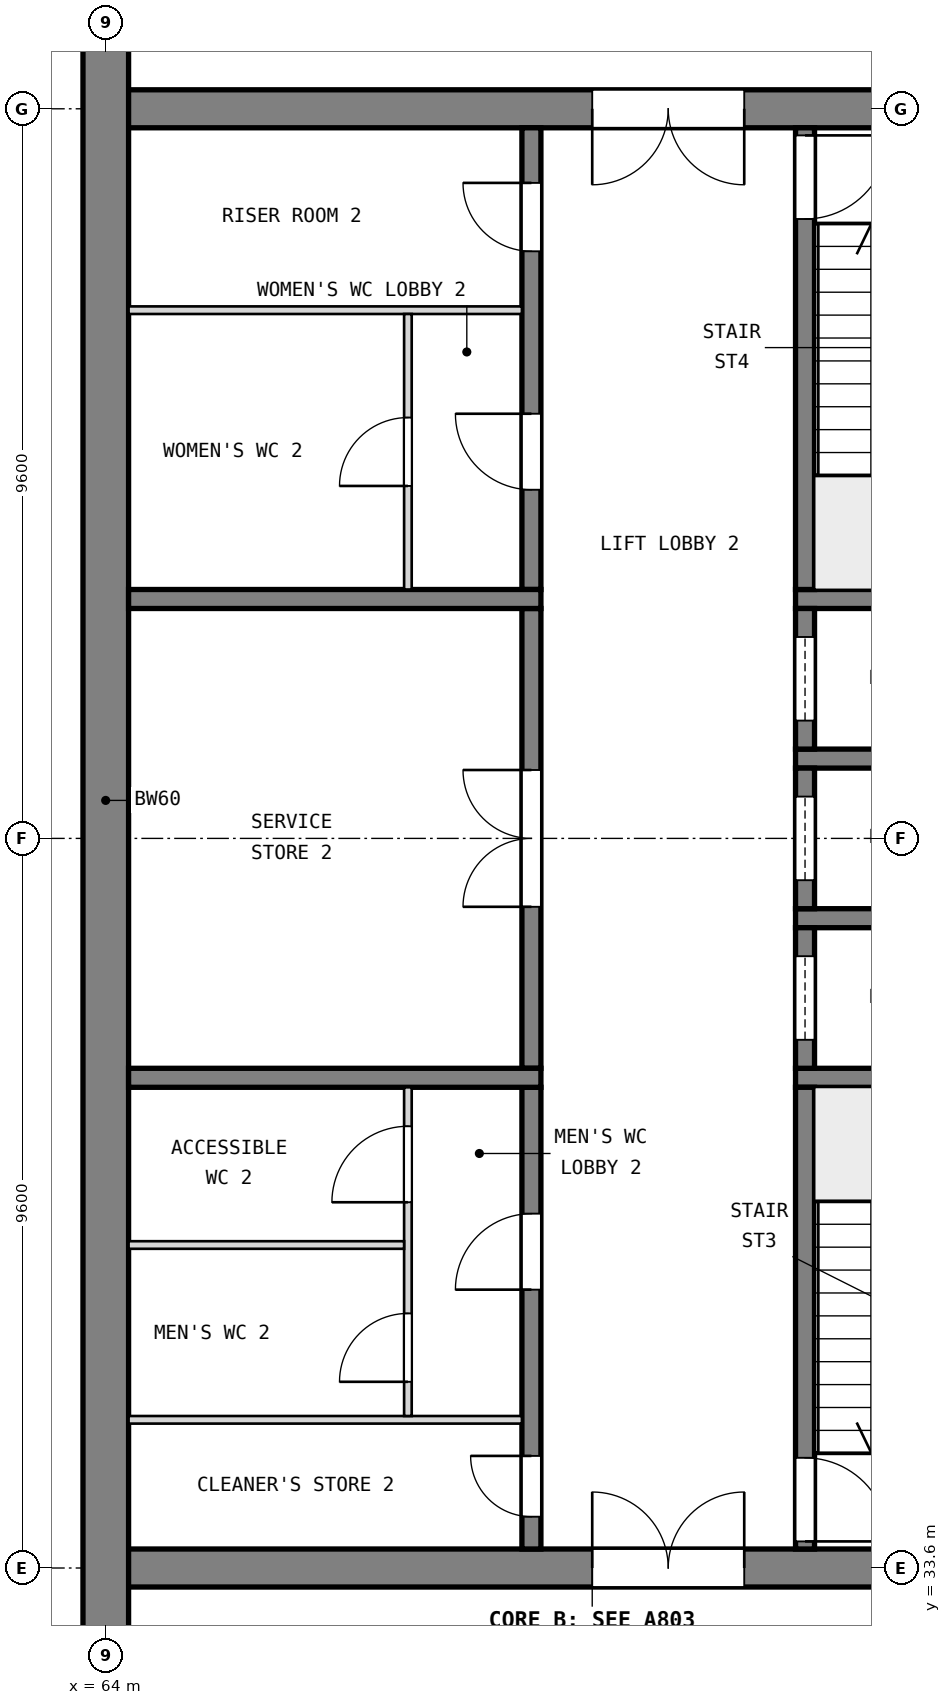
"""IFC4 building model, lengths in metres.
Left out: names, types, materials, properties, quantities, classifications, styles, units other than length and angle.
Written with IfcOpenShell. Run it as: python <this file> out.ifc"""

import sys

from ifc_helpers import new_model, si_unit, direction, frame, frame_2d, origin, place, context, subcontext, project, spatial, rectangle, extrude, element, fill, save


model = new_model("IFC4")
c1 = context("Model", 3, precision=1e-05, world=origin(), true_north=direction((0.0, 1.0)))
c2 = subcontext(c1, "Body", "Model", "MODEL_VIEW")
j1 = project(units=[si_unit("LENGTHUNIT", "METRE"), si_unit("PLANEANGLEUNIT", "RADIAN")], contexts=[c1])
p1 = place(None, origin())
s1 = spatial("IfcSite", under=j1, at=p1, CompositionType="ELEMENT")
p2 = place(p1, origin())
s2 = spatial("IfcBuilding", under=s1, at=p2, CompositionType="ELEMENT")
p3 = place(p2, frame((0.0, 0.0, 4.2)))
s3 = spatial("IfcBuildingStorey", under=s2, at=p3, CompositionType="ELEMENT", Elevation=4.2)
p4 = place(p3, frame((63.75, 52.8, 0.0), z_axis=(0.0, 0.0, 1.0), x_axis=(1.0, 0.0, 0.0)))
e1 = element("IfcWall", 1, at=p4, inside=s3, PredefinedType="SHEAR", context=c2, shape_type="SweptSolid", body=[
    extrude(rectangle(XDim=13.3, YDim=0.5, at=frame_2d((6.65, 0.0))), origin(), (0.0, 0.0, 1.0), 4.2),
])
p5 = place(p4, frame((6.65, 0.0, 0.0)))
e2 = element("IfcOpeningElement", 2, at=p5, cuts=e1, PredefinedType="OPENING", context=c2, shape_type="SweptSolid", body=[
    extrude(rectangle(XDim=2.0, YDim=2.1, at=frame_2d((1.0, 1.05))), frame((0.0, 0.26, 0.0), z_axis=(0.0, -1.0, 0.0), x_axis=(1.0, 0.0, 0.0)), (0.0, 0.0, 1.0), 0.52),
])
p6 = place(p3, frame((63.75, 33.6, 0.0), z_axis=(0.0, 0.0, 1.0), x_axis=(1.0, 0.0, 0.0)))
e3 = element("IfcWall", 3, at=p6, inside=s3, PredefinedType="SHEAR", context=c2, shape_type="SweptSolid", body=[
    extrude(rectangle(XDim=13.3, YDim=0.5, at=frame_2d((6.65, 0.0))), origin(), (0.0, 0.0, 1.0), 4.2),
])
p7 = place(p6, frame((6.65, 0.0, 0.0)))
e4 = element("IfcOpeningElement", 4, at=p7, cuts=e3, PredefinedType="OPENING", context=c2, shape_type="SweptSolid", body=[
    extrude(rectangle(XDim=2.0, YDim=2.1, at=frame_2d((1.0, 1.05))), frame((0.0, 0.26, 0.0), z_axis=(0.0, -1.0, 0.0), x_axis=(1.0, 0.0, 0.0)), (0.0, 0.0, 1.0), 0.52),
])
p8 = place(p3, frame((64.0, 28.8, 0.0), z_axis=(0.0, 0.0, 1.0), x_axis=(0.0, 1.0, 0.0)))
e5 = element("IfcWall", 5, at=p8, inside=s3, PredefinedType="SHEAR", context=c2, shape_type="SweptSolid", body=[
    extrude(rectangle(XDim=28.8, YDim=0.6, at=frame_2d((14.4, 0.0))), origin(), (0.0, 0.0, 1.0), 4.2),
])
for number, where, z_axis, x_axis in (
    (6, (76.55, 40.05, 0.0), (0.0, 0.0, 1.0), (-1.0, 0.0, 0.0)),
    (7, (76.55, 42.15, 0.0), (0.0, 0.0, 1.0), (-1.0, 0.0, 0.0)),
    (8, (76.55, 44.25, 0.0), (0.0, 0.0, 1.0), (-1.0, 0.0, 0.0)),
    (9, (76.55, 46.35, 0.0), (0.0, 0.0, 1.0), (-1.0, 0.0, 0.0)),
):
    element("IfcWall", number, at=place(p3, frame(where, z_axis=z_axis, x_axis=x_axis)), inside=s3, PredefinedType="SOLIDWALL", context=c2, shape_type="SweptSolid", body=[
        extrude(rectangle(XDim=3.475, YDim=0.25, at=frame_2d((1.738, 0.0))), origin(), (0.0, 0.0, 1.0), 3.9),
    ])
p9 = place(p3, frame((73.2, 33.85, 0.0), z_axis=(0.0, 0.0, 1.0), x_axis=(0.0, 1.0, 0.0)))
e10 = element("IfcWall", 10, at=p9, inside=s3, PredefinedType="SOLIDWALL", context=c2, shape_type="SweptSolid", body=[
    extrude(rectangle(XDim=6.075, YDim=0.25, at=frame_2d((3.038, 0.0))), origin(), (0.0, 0.0, 1.0), 3.9),
])
p10 = place(p9, frame((0.1, 0.0, 0.0)))
e11 = element("IfcOpeningElement", 11, at=p10, cuts=e10, PredefinedType="OPENING", context=c2, shape_type="SweptSolid", body=[
    extrude(rectangle(XDim=1.1, YDim=2.1, at=frame_2d((0.55, 1.05))), frame((0.0, 0.135, 0.0), z_axis=(0.0, -1.0, 0.0), x_axis=(1.0, 0.0, 0.0)), (0.0, 0.0, 1.0), 0.27),
])
p11 = place(p3, frame((73.2, 40.175, 0.0), z_axis=(0.0, 0.0, 1.0), x_axis=(0.0, 1.0, 0.0)))
e12 = element("IfcWall", 12, at=p11, inside=s3, PredefinedType="SOLIDWALL", context=c2, shape_type="SweptSolid", body=[
    extrude(rectangle(XDim=1.85, YDim=0.25, at=frame_2d((0.925, 0.0))), origin(), (0.0, 0.0, 1.0), 3.9),
])
p12 = place(p11, frame((0.375, 0.0, 0.0)))
e13 = element("IfcOpeningElement", 13, at=p12, cuts=e12, PredefinedType="OPENING", context=c2, shape_type="SweptSolid", body=[
    extrude(rectangle(XDim=1.1, YDim=2.1, at=frame_2d((0.55, 1.05))), frame((0.0, 0.135, 0.0), z_axis=(0.0, -1.0, 0.0), x_axis=(1.0, 0.0, 0.0)), (0.0, 0.0, 1.0), 0.27),
])
p13 = place(p3, frame((73.2, 42.275, 0.0), z_axis=(0.0, 0.0, 1.0), x_axis=(0.0, 1.0, 0.0)))
e14 = element("IfcWall", 14, at=p13, inside=s3, PredefinedType="SOLIDWALL", context=c2, shape_type="SweptSolid", body=[
    extrude(rectangle(XDim=1.85, YDim=0.25, at=frame_2d((0.925, 0.0))), origin(), (0.0, 0.0, 1.0), 3.9),
])
p14 = place(p13, frame((0.375, 0.0, 0.0)))
e15 = element("IfcOpeningElement", 15, at=p14, cuts=e14, PredefinedType="OPENING", context=c2, shape_type="SweptSolid", body=[
    extrude(rectangle(XDim=1.1, YDim=2.1, at=frame_2d((0.55, 1.05))), frame((0.0, 0.135, 0.0), z_axis=(0.0, -1.0, 0.0), x_axis=(1.0, 0.0, 0.0)), (0.0, 0.0, 1.0), 0.27),
])
p15 = place(p3, frame((73.2, 44.375, 0.0), z_axis=(0.0, 0.0, 1.0), x_axis=(0.0, 1.0, 0.0)))
e16 = element("IfcWall", 16, at=p15, inside=s3, PredefinedType="SOLIDWALL", context=c2, shape_type="SweptSolid", body=[
    extrude(rectangle(XDim=1.85, YDim=0.25, at=frame_2d((0.925, 0.0))), origin(), (0.0, 0.0, 1.0), 3.9),
])
p16 = place(p15, frame((0.375, 0.0, 0.0)))
e17 = element("IfcOpeningElement", 17, at=p16, cuts=e16, PredefinedType="OPENING", context=c2, shape_type="SweptSolid", body=[
    extrude(rectangle(XDim=1.1, YDim=2.1, at=frame_2d((0.55, 1.05))), frame((0.0, 0.135, 0.0), z_axis=(0.0, -1.0, 0.0), x_axis=(1.0, 0.0, 0.0)), (0.0, 0.0, 1.0), 0.27),
])
p17 = place(p3, frame((73.2, 46.475, 0.0), z_axis=(0.0, 0.0, 1.0), x_axis=(0.0, 1.0, 0.0)))
e18 = element("IfcWall", 18, at=p17, inside=s3, PredefinedType="SOLIDWALL", context=c2, shape_type="SweptSolid", body=[
    extrude(rectangle(XDim=6.075, YDim=0.25, at=frame_2d((3.038, 0.0))), origin(), (0.0, 0.0, 1.0), 3.9),
])
p18 = place(p17, frame((4.875, 0.0, 0.0)))
e19 = element("IfcOpeningElement", 19, at=p18, cuts=e18, PredefinedType="OPENING", context=c2, shape_type="SweptSolid", body=[
    extrude(rectangle(XDim=1.1, YDim=2.1, at=frame_2d((0.55, 1.05))), frame((0.0, 0.135, 0.0), z_axis=(0.0, -1.0, 0.0), x_axis=(1.0, 0.0, 0.0)), (0.0, 0.0, 1.0), 0.27),
])
p19 = place(p3, frame((69.6, 33.85, 0.0), z_axis=(0.0, 0.0, 1.0), x_axis=(0.0, 1.0, 0.0)))
e20 = element("IfcWall", 20, at=p19, inside=s3, PredefinedType="SOLIDWALL", context=c2, shape_type="SweptSolid", body=[
    extrude(rectangle(XDim=6.075, YDim=0.25, at=frame_2d((3.038, 0.0))), origin(), (0.0, 0.0, 1.0), 3.9),
])
p20 = place(p19, frame((0.425, 0.0, 0.0)))
e21 = element("IfcOpeningElement", 21, at=p20, cuts=e20, PredefinedType="OPENING", context=c2, shape_type="SweptSolid", body=[
    extrude(rectangle(XDim=0.8, YDim=2.1, at=frame_2d((0.4, 1.05))), frame((0.0, 0.135, 0.0), z_axis=(0.0, -1.0, 0.0), x_axis=(1.0, 0.0, 0.0)), (0.0, 0.0, 1.0), 0.27),
])
p21 = place(p19, frame((3.413, 0.0, 0.0)))
e22 = element("IfcOpeningElement", 22, at=p21, cuts=e20, PredefinedType="OPENING", context=c2, shape_type="SweptSolid", body=[
    extrude(rectangle(XDim=1.0, YDim=2.1, at=frame_2d((0.5, 1.05))), frame((0.0, 0.135, 0.0), z_axis=(0.0, -1.0, 0.0), x_axis=(1.0, 0.0, 0.0)), (0.0, 0.0, 1.0), 0.27),
])
p22 = place(p3, frame((69.6, 40.175, 0.0), z_axis=(0.0, 0.0, 1.0), x_axis=(0.0, 1.0, 0.0)))
e23 = element("IfcWall", 23, at=p22, inside=s3, PredefinedType="SOLIDWALL", context=c2, shape_type="SweptSolid", body=[
    extrude(rectangle(XDim=6.05, YDim=0.25, at=frame_2d((3.025, 0.0))), origin(), (0.0, 0.0, 1.0), 3.9),
])
p23 = place(p22, frame((2.125, 0.0, 0.0)))
e24 = element("IfcOpeningElement", 24, at=p23, cuts=e23, PredefinedType="OPENING", context=c2, shape_type="SweptSolid", body=[
    extrude(rectangle(XDim=1.8, YDim=2.1, at=frame_2d((0.9, 1.05))), frame((0.0, 0.135, 0.0), z_axis=(0.0, -1.0, 0.0), x_axis=(1.0, 0.0, 0.0)), (0.0, 0.0, 1.0), 0.27),
])
p24 = place(p3, frame((69.6, 46.475, 0.0), z_axis=(0.0, 0.0, 1.0), x_axis=(0.0, 1.0, 0.0)))
e25 = element("IfcWall", 25, at=p24, inside=s3, PredefinedType="SOLIDWALL", context=c2, shape_type="SweptSolid", body=[
    extrude(rectangle(XDim=6.075, YDim=0.25, at=frame_2d((3.038, 0.0))), origin(), (0.0, 0.0, 1.0), 3.9),
])
p25 = place(p24, frame((1.312, 0.0, 0.0)))
e26 = element("IfcOpeningElement", 26, at=p25, cuts=e25, PredefinedType="OPENING", context=c2, shape_type="SweptSolid", body=[
    extrude(rectangle(XDim=1.0, YDim=2.1, at=frame_2d((0.5, 1.05))), frame((0.0, 0.135, 0.0), z_axis=(0.0, -1.0, 0.0), x_axis=(1.0, 0.0, 0.0)), (0.0, 0.0, 1.0), 0.27),
])
p26 = place(p24, frame((4.45, 0.0, 0.0)))
e27 = element("IfcOpeningElement", 27, at=p26, cuts=e25, PredefinedType="OPENING", context=c2, shape_type="SweptSolid", body=[
    extrude(rectangle(XDim=0.9, YDim=2.1, at=frame_2d((0.45, 1.05))), frame((0.0, 0.135, 0.0), z_axis=(0.0, -1.0, 0.0), x_axis=(1.0, 0.0, 0.0)), (0.0, 0.0, 1.0), 0.27),
])
for number, where, z_axis, x_axis in (
    (28, (69.725, 40.05, 0.0), (0.0, 0.0, 1.0), (-1.0, 0.0, 0.0)),
    (29, (69.725, 46.35, 0.0), (0.0, 0.0, 1.0), (-1.0, 0.0, 0.0)),
):
    element("IfcWall", number, at=place(p3, frame(where, z_axis=z_axis, x_axis=x_axis)), inside=s3, PredefinedType="SOLIDWALL", context=c2, shape_type="SweptSolid", body=[
        extrude(rectangle(XDim=5.425, YDim=0.25, at=frame_2d((2.712, 0.0))), origin(), (0.0, 0.0, 1.0), 3.9),
    ])
p27 = place(p3, frame((69.475, 35.55, 0.0), z_axis=(0.0, 0.0, 1.0), x_axis=(-1.0, 0.0, 0.0)))
e30 = element("IfcWall", 30, at=p27, inside=s3, PredefinedType="PARTITIONING", context=c2, shape_type="SweptSolid", body=[
    extrude(rectangle(XDim=5.175, YDim=0.1, at=frame_2d((2.587, 0.0))), origin(), (0.0, 0.0, 1.0), 3.9),
])
p28 = place(p3, frame((67.975, 35.6, 0.0), z_axis=(0.0, 0.0, 1.0), x_axis=(0.0, 1.0, 0.0)))
e31 = element("IfcWall", 31, at=p28, inside=s3, PredefinedType="PARTITIONING", context=c2, shape_type="SweptSolid", body=[
    extrude(rectangle(XDim=4.325, YDim=0.1, at=frame_2d((2.163, 0.0))), origin(), (0.0, 0.0, 1.0), 3.9),
])
p29 = place(p28, frame((0.45, 0.0, 0.0)))
e32 = element("IfcOpeningElement", 32, at=p29, cuts=e31, PredefinedType="OPENING", context=c2, shape_type="SweptSolid", body=[
    extrude(rectangle(XDim=0.9, YDim=2.1, at=frame_2d((0.45, 1.05))), frame((0.0, 0.06, 0.0), z_axis=(0.0, -1.0, 0.0), x_axis=(1.0, 0.0, 0.0)), (0.0, 0.0, 1.0), 0.12),
])
p30 = place(p28, frame((2.812, 0.0, 0.0)))
e33 = element("IfcOpeningElement", 33, at=p30, cuts=e31, PredefinedType="OPENING", context=c2, shape_type="SweptSolid", body=[
    extrude(rectangle(XDim=1.0, YDim=2.1, at=frame_2d((0.5, 1.05))), frame((0.0, 0.06, 0.0), z_axis=(0.0, -1.0, 0.0), x_axis=(1.0, 0.0, 0.0)), (0.0, 0.0, 1.0), 0.12),
])
p31 = place(p3, frame((67.925, 37.85, 0.0), z_axis=(0.0, 0.0, 1.0), x_axis=(-1.0, 0.0, 0.0)))
e34 = element("IfcWall", 34, at=p31, inside=s3, PredefinedType="PARTITIONING", context=c2, shape_type="SweptSolid", body=[
    extrude(rectangle(XDim=3.625, YDim=0.1, at=frame_2d((1.812, 0.0))), origin(), (0.0, 0.0, 1.0), 3.9),
])
p32 = place(p3, frame((69.475, 50.15, 0.0), z_axis=(0.0, 0.0, 1.0), x_axis=(-1.0, 0.0, 0.0)))
e35 = element("IfcWall", 35, at=p32, inside=s3, PredefinedType="PARTITIONING", context=c2, shape_type="SweptSolid", body=[
    extrude(rectangle(XDim=5.175, YDim=0.1, at=frame_2d((2.587, 0.0))), origin(), (0.0, 0.0, 1.0), 3.9),
])
p33 = place(p3, frame((67.975, 46.475, 0.0), z_axis=(0.0, 0.0, 1.0), x_axis=(0.0, 1.0, 0.0)))
e36 = element("IfcWall", 36, at=p33, inside=s3, PredefinedType="PARTITIONING", context=c2, shape_type="SweptSolid", body=[
    extrude(rectangle(XDim=3.625, YDim=0.1, at=frame_2d((1.812, 0.0))), origin(), (0.0, 0.0, 1.0), 3.9),
])
p34 = place(p33, frame((1.363, 0.0, 0.0)))
e37 = element("IfcOpeningElement", 37, at=p34, cuts=e36, PredefinedType="OPENING", context=c2, shape_type="SweptSolid", body=[
    extrude(rectangle(XDim=0.9, YDim=2.1, at=frame_2d((0.45, 1.05))), frame((0.0, 0.06, 0.0), z_axis=(0.0, -1.0, 0.0), x_axis=(1.0, 0.0, 0.0)), (0.0, 0.0, 1.0), 0.12),
])
p35 = place(p10, frame((1.1, 0.0, 0.0), z_axis=(0.0, 0.0, 1.0), x_axis=(-1.0, 0.0, 0.0)))
e38 = element("IfcDoor", 38, at=p35, inside=s3, OperationType="SINGLE_SWING_RIGHT", PredefinedType="DOOR", context=c2, shape_type="SweptSolid", body=[
    extrude(rectangle(XDim=1.1, YDim=2.1, at=frame_2d((0.55, 1.05))), frame((0.0, 0.025, 0.0), z_axis=(0.0, -1.0, 0.0), x_axis=(1.0, 0.0, 0.0)), (0.0, 0.0, 1.0), 0.05),
])
fill(e11, e38)
p36 = place(p18, frame((1.1, 0.0, 0.0), z_axis=(0.0, 0.0, 1.0), x_axis=(-1.0, 0.0, 0.0)))
e39 = element("IfcDoor", 39, at=p36, inside=s3, OperationType="SINGLE_SWING_LEFT", PredefinedType="DOOR", context=c2, shape_type="SweptSolid", body=[
    extrude(rectangle(XDim=1.1, YDim=2.1, at=frame_2d((0.55, 1.05))), frame((0.0, 0.025, 0.0), z_axis=(0.0, -1.0, 0.0), x_axis=(1.0, 0.0, 0.0)), (0.0, 0.0, 1.0), 0.05),
])
fill(e19, e39)
p37 = place(p12, origin())
e40 = element("IfcDoor", 40, at=p37, inside=s3, OperationType="SLIDING_TO_LEFT", PredefinedType="DOOR", context=c2, shape_type="SweptSolid", body=[
    extrude(rectangle(XDim=1.1, YDim=2.1, at=frame_2d((0.55, 1.05))), frame((0.0, 0.025, 0.0), z_axis=(0.0, -1.0, 0.0), x_axis=(1.0, 0.0, 0.0)), (0.0, 0.0, 1.0), 0.05),
])
fill(e13, e40)
p38 = place(p14, origin())
e41 = element("IfcDoor", 41, at=p38, inside=s3, OperationType="SLIDING_TO_LEFT", PredefinedType="DOOR", context=c2, shape_type="SweptSolid", body=[
    extrude(rectangle(XDim=1.1, YDim=2.1, at=frame_2d((0.55, 1.05))), frame((0.0, 0.025, 0.0), z_axis=(0.0, -1.0, 0.0), x_axis=(1.0, 0.0, 0.0)), (0.0, 0.0, 1.0), 0.05),
])
fill(e15, e41)
p39 = place(p16, origin())
e42 = element("IfcDoor", 42, at=p39, inside=s3, OperationType="SLIDING_TO_LEFT", PredefinedType="DOOR", context=c2, shape_type="SweptSolid", body=[
    extrude(rectangle(XDim=1.1, YDim=2.1, at=frame_2d((0.55, 1.05))), frame((0.0, 0.025, 0.0), z_axis=(0.0, -1.0, 0.0), x_axis=(1.0, 0.0, 0.0)), (0.0, 0.0, 1.0), 0.05),
])
fill(e17, e42)
p40 = place(p23, origin())
e43 = element("IfcDoor", 43, at=p40, inside=s3, OperationType="DOUBLE_DOOR_SINGLE_SWING", PredefinedType="DOOR", context=c2, shape_type="SweptSolid", body=[
    extrude(rectangle(XDim=1.8, YDim=2.1, at=frame_2d((0.9, 1.05))), frame((0.0, 0.025, 0.0), z_axis=(0.0, -1.0, 0.0), x_axis=(1.0, 0.0, 0.0)), (0.0, 0.0, 1.0), 0.05),
])
fill(e24, e43)
p41 = place(p20, origin())
e44 = element("IfcDoor", 44, at=p41, inside=s3, OperationType="SINGLE_SWING_RIGHT", PredefinedType="DOOR", context=c2, shape_type="SweptSolid", body=[
    extrude(rectangle(XDim=0.8, YDim=2.1, at=frame_2d((0.4, 1.05))), frame((0.0, 0.025, 0.0), z_axis=(0.0, -1.0, 0.0), x_axis=(1.0, 0.0, 0.0)), (0.0, 0.0, 1.0), 0.05),
])
fill(e21, e44)
p42 = place(p21, origin())
e45 = element("IfcDoor", 45, at=p42, inside=s3, OperationType="SINGLE_SWING_LEFT", PredefinedType="DOOR", context=c2, shape_type="SweptSolid", body=[
    extrude(rectangle(XDim=1.0, YDim=2.1, at=frame_2d((0.5, 1.05))), frame((0.0, 0.025, 0.0), z_axis=(0.0, -1.0, 0.0), x_axis=(1.0, 0.0, 0.0)), (0.0, 0.0, 1.0), 0.05),
])
fill(e22, e45)
p43 = place(p29, origin())
e46 = element("IfcDoor", 46, at=p43, inside=s3, OperationType="SINGLE_SWING_LEFT", PredefinedType="DOOR", context=c2, shape_type="SweptSolid", body=[
    extrude(rectangle(XDim=0.9, YDim=2.1, at=frame_2d((0.45, 1.05))), frame((0.0, 0.025, 0.0), z_axis=(0.0, -1.0, 0.0), x_axis=(1.0, 0.0, 0.0)), (0.0, 0.0, 1.0), 0.05),
])
fill(e32, e46)
p44 = place(p30, origin())
e47 = element("IfcDoor", 47, at=p44, inside=s3, OperationType="SINGLE_SWING_LEFT", PredefinedType="DOOR", context=c2, shape_type="SweptSolid", body=[
    extrude(rectangle(XDim=1.0, YDim=2.1, at=frame_2d((0.5, 1.05))), frame((0.0, 0.025, 0.0), z_axis=(0.0, -1.0, 0.0), x_axis=(1.0, 0.0, 0.0)), (0.0, 0.0, 1.0), 0.05),
])
fill(e33, e47)
p45 = place(p25, origin())
e48 = element("IfcDoor", 48, at=p45, inside=s3, OperationType="SINGLE_SWING_RIGHT", PredefinedType="DOOR", context=c2, shape_type="SweptSolid", body=[
    extrude(rectangle(XDim=1.0, YDim=2.1, at=frame_2d((0.5, 1.05))), frame((0.0, 0.025, 0.0), z_axis=(0.0, -1.0, 0.0), x_axis=(1.0, 0.0, 0.0)), (0.0, 0.0, 1.0), 0.05),
])
fill(e26, e48)
p46 = place(p34, origin())
e49 = element("IfcDoor", 49, at=p46, inside=s3, OperationType="SINGLE_SWING_LEFT", PredefinedType="DOOR", context=c2, shape_type="SweptSolid", body=[
    extrude(rectangle(XDim=0.9, YDim=2.1, at=frame_2d((0.45, 1.05))), frame((0.0, 0.025, 0.0), z_axis=(0.0, -1.0, 0.0), x_axis=(1.0, 0.0, 0.0)), (0.0, 0.0, 1.0), 0.05),
])
fill(e37, e49)
p47 = place(p26, origin())
e50 = element("IfcDoor", 50, at=p47, inside=s3, OperationType="SINGLE_SWING_RIGHT", PredefinedType="DOOR", context=c2, shape_type="SweptSolid", body=[
    extrude(rectangle(XDim=0.9, YDim=2.1, at=frame_2d((0.45, 1.05))), frame((0.0, 0.025, 0.0), z_axis=(0.0, -1.0, 0.0), x_axis=(1.0, 0.0, 0.0)), (0.0, 0.0, 1.0), 0.05),
])
fill(e27, e50)
p48 = place(p7, origin())
e51 = element("IfcDoor", 51, at=p48, inside=s3, OperationType="DOUBLE_DOOR_SINGLE_SWING", PredefinedType="DOOR", context=c2, shape_type="SweptSolid", body=[
    extrude(rectangle(XDim=2.0, YDim=2.1, at=frame_2d((1.0, 1.05))), frame((0.0, 0.025, 0.0), z_axis=(0.0, -1.0, 0.0), x_axis=(1.0, 0.0, 0.0)), (0.0, 0.0, 1.0), 0.05),
])
fill(e4, e51)
p49 = place(p5, frame((2.0, 0.0, 0.0), z_axis=(0.0, 0.0, 1.0), x_axis=(-1.0, 0.0, 0.0)))
e52 = element("IfcDoor", 52, at=p49, inside=s3, OperationType="DOUBLE_DOOR_SINGLE_SWING", PredefinedType="DOOR", context=c2, shape_type="SweptSolid", body=[
    extrude(rectangle(XDim=2.0, YDim=2.1, at=frame_2d((1.0, 1.05))), frame((0.0, 0.025, 0.0), z_axis=(0.0, -1.0, 0.0), x_axis=(1.0, 0.0, 0.0)), (0.0, 0.0, 1.0), 0.05),
])
fill(e2, e52)
save(model, sys.argv[1])
